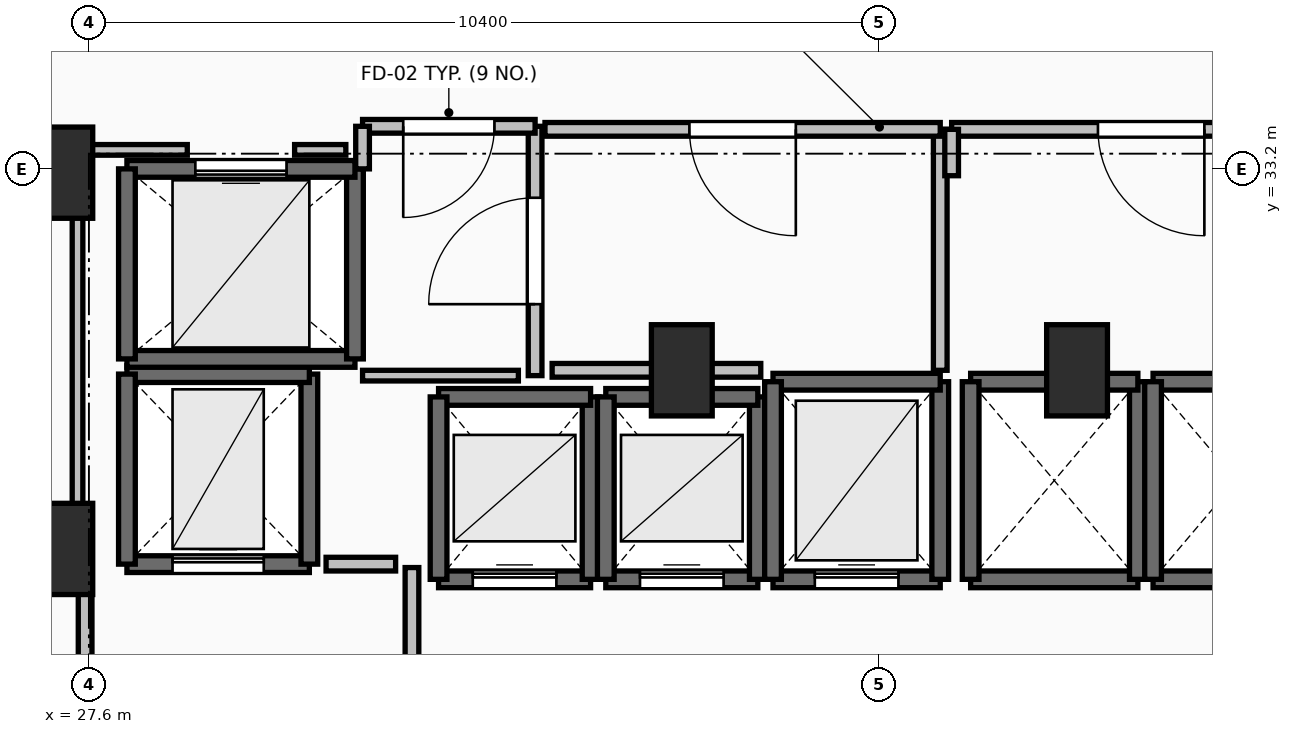
"""IFC4 building model, lengths in metres.
Left out: names, types, materials, properties, quantities, classifications, styles, units other than length and angle.
Written with IfcOpenShell. Run it as: python <this file> out.ifc"""

import sys

from ifc_helpers import new_model, si_unit, direction, frame, frame_2d, origin, origin_2d, place, context, subcontext, project, spatial, rectangle, extrude, element, fill, save


model = new_model("IFC4")
c1 = context("Model", 3, precision=1e-05, world=origin(), true_north=direction((0.0, 1.0)))
c2 = subcontext(c1, "Body", "Model", "MODEL_VIEW")
j1 = project(units=[si_unit("LENGTHUNIT", "METRE"), si_unit("PLANEANGLEUNIT", "RADIAN")], contexts=[c1])
p1 = place(None, origin())
s1 = spatial("IfcSite", under=j1, at=p1, CompositionType="ELEMENT")
p2 = place(p1, origin())
s2 = spatial("IfcBuilding", under=s1, at=p2, CompositionType="ELEMENT")
p3 = place(p2, frame((0.0, 0.0, 69.5)))
s3 = spatial("IfcBuildingStorey", under=s2, at=p3, CompositionType="ELEMENT", Elevation=69.5)
for number, where, z_axis, x_axis in (
    (1, (27.25, 28.2, 0.0), (0.0, 0.0, 1.0), (1.0, 0.0, 0.0)),
    (2, (27.25, 33.15, 0.0), (0.0, 0.0, 1.0), (1.0, 0.0, 0.0)),
    (3, (35.4, 30.55, 0.0), (0.0, 0.0, 1.0), (1.0, 0.0, 0.0)),
    (4, (40.6, 30.55, 0.0), (0.0, 0.0, 1.0), (1.0, 0.0, 0.0)),
):
    element("IfcColumn", number, at=place(p3, frame(where, z_axis=z_axis, x_axis=x_axis)), inside=s3, PredefinedType="PILASTER", context=c2, shape_type="SweptSolid", body=[
        extrude(rectangle(XDim=0.8, YDim=1.2, at=origin_2d()), origin(), (0.0, 0.0, 1.0), 4.8),
    ])
p4 = place(p3, frame((32.2, 27.8, 0.0), z_axis=(0.0, 0.0, 1.0), x_axis=(1.0, 0.0, 0.0)))
e5 = element("IfcWall", 5, at=p4, inside=s3, PredefinedType="SOLIDWALL", context=c2, shape_type="SweptSolid", body=[
    extrude(rectangle(XDim=2.0, YDim=0.22, at=frame_2d((1.0, 0.0))), origin(), (0.0, 0.0, 1.0), 4.5),
])
p5 = place(p4, frame((0.45, 0.0, 0.0)))
e6 = element("IfcOpeningElement", 6, at=p5, cuts=e5, PredefinedType="OPENING", context=c2, shape_type="SweptSolid", body=[
    extrude(rectangle(XDim=1.1, YDim=2.2, at=frame_2d((0.55, 1.1))), frame((0.0, 0.125, 0.0), z_axis=(0.0, -1.0, 0.0), x_axis=(1.0, 0.0, 0.0)), (0.0, 0.0, 1.0), 0.25),
])
p6 = place(p3, frame((34.2, 27.8, 0.0), z_axis=(0.0, 0.0, 1.0), x_axis=(0.0, 1.0, 0.0)))
e7 = element("IfcWall", 7, at=p6, inside=s3, PredefinedType="SOLIDWALL", context=c2, shape_type="SweptSolid", body=[
    extrude(rectangle(XDim=2.4, YDim=0.22, at=frame_2d((1.2, 0.0))), origin(), (0.0, 0.0, 1.0), 4.5),
])
p7 = place(p3, frame((34.2, 30.2, 0.0), z_axis=(0.0, 0.0, 1.0), x_axis=(-1.0, 0.0, 0.0)))
e8 = element("IfcWall", 8, at=p7, inside=s3, PredefinedType="SOLIDWALL", context=c2, shape_type="SweptSolid", body=[
    extrude(rectangle(XDim=2.0, YDim=0.22, at=frame_2d((1.0, 0.0))), origin(), (0.0, 0.0, 1.0), 4.5),
])
p8 = place(p3, frame((32.2, 30.2, 0.0), z_axis=(0.0, 0.0, 1.0), x_axis=(0.0, -1.0, 0.0)))
e9 = element("IfcWall", 9, at=p8, inside=s3, PredefinedType="SOLIDWALL", context=c2, shape_type="SweptSolid", body=[
    extrude(rectangle(XDim=2.4, YDim=0.22, at=frame_2d((1.2, 0.0))), origin(), (0.0, 0.0, 1.0), 4.5),
])
p9 = place(p3, frame((34.4, 27.8, 0.0), z_axis=(0.0, 0.0, 1.0), x_axis=(1.0, 0.0, 0.0)))
e10 = element("IfcWall", 10, at=p9, inside=s3, PredefinedType="SOLIDWALL", context=c2, shape_type="SweptSolid", body=[
    extrude(rectangle(XDim=2.0, YDim=0.22, at=frame_2d((1.0, 0.0))), origin(), (0.0, 0.0, 1.0), 4.5),
])
p10 = place(p9, frame((0.45, 0.0, 0.0)))
e11 = element("IfcOpeningElement", 11, at=p10, cuts=e10, PredefinedType="OPENING", context=c2, shape_type="SweptSolid", body=[
    extrude(rectangle(XDim=1.1, YDim=2.2, at=frame_2d((0.55, 1.1))), frame((0.0, 0.125, 0.0), z_axis=(0.0, -1.0, 0.0), x_axis=(1.0, 0.0, 0.0)), (0.0, 0.0, 1.0), 0.25),
])
p11 = place(p3, frame((36.4, 27.8, 0.0), z_axis=(0.0, 0.0, 1.0), x_axis=(0.0, 1.0, 0.0)))
e12 = element("IfcWall", 12, at=p11, inside=s3, PredefinedType="SOLIDWALL", context=c2, shape_type="SweptSolid", body=[
    extrude(rectangle(XDim=2.4, YDim=0.22, at=frame_2d((1.2, 0.0))), origin(), (0.0, 0.0, 1.0), 4.5),
])
p12 = place(p3, frame((36.4, 30.2, 0.0), z_axis=(0.0, 0.0, 1.0), x_axis=(-1.0, 0.0, 0.0)))
e13 = element("IfcWall", 13, at=p12, inside=s3, PredefinedType="SOLIDWALL", context=c2, shape_type="SweptSolid", body=[
    extrude(rectangle(XDim=2.0, YDim=0.22, at=frame_2d((1.0, 0.0))), origin(), (0.0, 0.0, 1.0), 4.5),
])
p13 = place(p3, frame((34.4, 30.2, 0.0), z_axis=(0.0, 0.0, 1.0), x_axis=(0.0, -1.0, 0.0)))
e14 = element("IfcWall", 14, at=p13, inside=s3, PredefinedType="SOLIDWALL", context=c2, shape_type="SweptSolid", body=[
    extrude(rectangle(XDim=2.4, YDim=0.22, at=frame_2d((1.2, 0.0))), origin(), (0.0, 0.0, 1.0), 4.5),
])
p14 = place(p3, frame((36.6, 27.8, 0.0), z_axis=(0.0, 0.0, 1.0), x_axis=(1.0, 0.0, 0.0)))
e15 = element("IfcWall", 15, at=p14, inside=s3, PredefinedType="SOLIDWALL", context=c2, shape_type="SweptSolid", body=[
    extrude(rectangle(XDim=2.2, YDim=0.22, at=frame_2d((1.1, 0.0))), origin(), (0.0, 0.0, 1.0), 4.5),
])
p15 = place(p14, frame((0.55, 0.0, 0.0)))
e16 = element("IfcOpeningElement", 16, at=p15, cuts=e15, PredefinedType="OPENING", context=c2, shape_type="SweptSolid", body=[
    extrude(rectangle(XDim=1.1, YDim=2.2, at=frame_2d((0.55, 1.1))), frame((0.0, 0.125, 0.0), z_axis=(0.0, -1.0, 0.0), x_axis=(1.0, 0.0, 0.0)), (0.0, 0.0, 1.0), 0.25),
])
p16 = place(p3, frame((38.8, 27.8, 0.0), z_axis=(0.0, 0.0, 1.0), x_axis=(0.0, 1.0, 0.0)))
e17 = element("IfcWall", 17, at=p16, inside=s3, PredefinedType="SOLIDWALL", context=c2, shape_type="SweptSolid", body=[
    extrude(rectangle(XDim=2.6, YDim=0.22, at=frame_2d((1.3, 0.0))), origin(), (0.0, 0.0, 1.0), 4.5),
])
p17 = place(p3, frame((38.8, 30.4, 0.0), z_axis=(0.0, 0.0, 1.0), x_axis=(-1.0, 0.0, 0.0)))
e18 = element("IfcWall", 18, at=p17, inside=s3, PredefinedType="SOLIDWALL", context=c2, shape_type="SweptSolid", body=[
    extrude(rectangle(XDim=2.2, YDim=0.22, at=frame_2d((1.1, 0.0))), origin(), (0.0, 0.0, 1.0), 4.5),
])
p18 = place(p3, frame((36.6, 30.4, 0.0), z_axis=(0.0, 0.0, 1.0), x_axis=(0.0, -1.0, 0.0)))
e19 = element("IfcWall", 19, at=p18, inside=s3, PredefinedType="SOLIDWALL", context=c2, shape_type="SweptSolid", body=[
    extrude(rectangle(XDim=2.6, YDim=0.22, at=frame_2d((1.3, 0.0))), origin(), (0.0, 0.0, 1.0), 4.5),
])
p19 = place(p3, frame((39.2, 27.8, 0.0), z_axis=(0.0, 0.0, 1.0), x_axis=(1.0, 0.0, 0.0)))
e20 = element("IfcWall", 20, at=p19, inside=s3, PredefinedType="SOLIDWALL", context=c2, shape_type="SweptSolid", body=[
    extrude(rectangle(XDim=2.2, YDim=0.22, at=frame_2d((1.1, 0.0))), origin(), (0.0, 0.0, 1.0), 4.5),
])
p20 = place(p3, frame((41.4, 27.8, 0.0), z_axis=(0.0, 0.0, 1.0), x_axis=(0.0, 1.0, 0.0)))
e21 = element("IfcWall", 21, at=p20, inside=s3, PredefinedType="SOLIDWALL", context=c2, shape_type="SweptSolid", body=[
    extrude(rectangle(XDim=2.6, YDim=0.22, at=frame_2d((1.3, 0.0))), origin(), (0.0, 0.0, 1.0), 4.5),
])
p21 = place(p3, frame((41.4, 30.4, 0.0), z_axis=(0.0, 0.0, 1.0), x_axis=(-1.0, 0.0, 0.0)))
e22 = element("IfcWall", 22, at=p21, inside=s3, PredefinedType="SOLIDWALL", context=c2, shape_type="SweptSolid", body=[
    extrude(rectangle(XDim=2.2, YDim=0.22, at=frame_2d((1.1, 0.0))), origin(), (0.0, 0.0, 1.0), 4.5),
])
p22 = place(p3, frame((39.2, 30.4, 0.0), z_axis=(0.0, 0.0, 1.0), x_axis=(0.0, -1.0, 0.0)))
e23 = element("IfcWall", 23, at=p22, inside=s3, PredefinedType="SOLIDWALL", context=c2, shape_type="SweptSolid", body=[
    extrude(rectangle(XDim=2.6, YDim=0.22, at=frame_2d((1.3, 0.0))), origin(), (0.0, 0.0, 1.0), 4.5),
])
for number, where, z_axis, x_axis in (
    (24, (41.6, 27.8, 0.0), (0.0, 0.0, 1.0), (1.0, 0.0, 0.0)),
    (25, (43.8, 30.4, 0.0), (0.0, 0.0, 1.0), (-1.0, 0.0, 0.0)),
):
    element("IfcWall", number, at=place(p3, frame(where, z_axis=z_axis, x_axis=x_axis)), inside=s3, PredefinedType="SOLIDWALL", context=c2, shape_type="SweptSolid", body=[
        extrude(rectangle(XDim=2.2, YDim=0.22, at=frame_2d((1.1, 0.0))), origin(), (0.0, 0.0, 1.0), 4.5),
    ])
p23 = place(p3, frame((41.6, 30.4, 0.0), z_axis=(0.0, 0.0, 1.0), x_axis=(0.0, -1.0, 0.0)))
e26 = element("IfcWall", 26, at=p23, inside=s3, PredefinedType="SOLIDWALL", context=c2, shape_type="SweptSolid", body=[
    extrude(rectangle(XDim=2.6, YDim=0.22, at=frame_2d((1.3, 0.0))), origin(), (0.0, 0.0, 1.0), 4.5),
])
p24 = place(p3, frame((28.1, 28.0, 0.0), z_axis=(0.0, 0.0, 1.0), x_axis=(1.0, 0.0, 0.0)))
e27 = element("IfcWall", 27, at=p24, inside=s3, PredefinedType="SHEAR", context=c2, shape_type="SweptSolid", body=[
    extrude(rectangle(XDim=2.4, YDim=0.22, at=frame_2d((1.2, 0.0))), origin(), (0.0, 0.0, 1.0), 4.5),
])
p25 = place(p24, frame((0.6, 0.0, 0.0)))
e28 = element("IfcOpeningElement", 28, at=p25, cuts=e27, PredefinedType="OPENING", context=c2, shape_type="SweptSolid", body=[
    extrude(rectangle(XDim=1.2, YDim=2.2, at=frame_2d((0.6, 1.1))), frame((0.0, 0.125, 0.0), z_axis=(0.0, -1.0, 0.0), x_axis=(1.0, 0.0, 0.0)), (0.0, 0.0, 1.0), 0.25),
])
p26 = place(p3, frame((30.5, 28.0, 0.0), z_axis=(0.0, 0.0, 1.0), x_axis=(0.0, 1.0, 0.0)))
e29 = element("IfcWall", 29, at=p26, inside=s3, PredefinedType="SHEAR", context=c2, shape_type="SweptSolid", body=[
    extrude(rectangle(XDim=2.5, YDim=0.22, at=frame_2d((1.25, 0.0))), origin(), (0.0, 0.0, 1.0), 4.5),
])
p27 = place(p3, frame((30.5, 30.5, 0.0), z_axis=(0.0, 0.0, 1.0), x_axis=(-1.0, 0.0, 0.0)))
e30 = element("IfcWall", 30, at=p27, inside=s3, PredefinedType="SHEAR", context=c2, shape_type="SweptSolid", body=[
    extrude(rectangle(XDim=2.4, YDim=0.22, at=frame_2d((1.2, 0.0))), origin(), (0.0, 0.0, 1.0), 4.5),
])
p28 = place(p3, frame((28.1, 30.5, 0.0), z_axis=(0.0, 0.0, 1.0), x_axis=(0.0, -1.0, 0.0)))
e31 = element("IfcWall", 31, at=p28, inside=s3, PredefinedType="SHEAR", context=c2, shape_type="SweptSolid", body=[
    extrude(rectangle(XDim=2.5, YDim=0.22, at=frame_2d((1.25, 0.0))), origin(), (0.0, 0.0, 1.0), 4.5),
])
p29 = place(p3, frame((28.1, 30.7, 0.0), z_axis=(0.0, 0.0, 1.0), x_axis=(1.0, 0.0, 0.0)))
e32 = element("IfcWall", 32, at=p29, inside=s3, PredefinedType="SOLIDWALL", context=c2, shape_type="SweptSolid", body=[
    extrude(rectangle(XDim=3.0, YDim=0.22, at=frame_2d((1.5, 0.0))), origin(), (0.0, 0.0, 1.0), 4.5),
])
p30 = place(p3, frame((31.1, 30.7, 0.0), z_axis=(0.0, 0.0, 1.0), x_axis=(0.0, 1.0, 0.0)))
e33 = element("IfcWall", 33, at=p30, inside=s3, PredefinedType="SOLIDWALL", context=c2, shape_type="SweptSolid", body=[
    extrude(rectangle(XDim=2.5, YDim=0.22, at=frame_2d((1.25, 0.0))), origin(), (0.0, 0.0, 1.0), 4.5),
])
p31 = place(p3, frame((31.1, 33.2, 0.0), z_axis=(0.0, 0.0, 1.0), x_axis=(-1.0, 0.0, 0.0)))
e34 = element("IfcWall", 34, at=p31, inside=s3, PredefinedType="SOLIDWALL", context=c2, shape_type="SweptSolid", body=[
    extrude(rectangle(XDim=3.0, YDim=0.22, at=frame_2d((1.5, 0.0))), origin(), (0.0, 0.0, 1.0), 4.5),
])
p32 = place(p31, frame((0.9, 0.0, 0.0)))
e35 = element("IfcOpeningElement", 35, at=p32, cuts=e34, PredefinedType="OPENING", context=c2, shape_type="SweptSolid", body=[
    extrude(rectangle(XDim=1.2, YDim=2.2, at=frame_2d((0.6, 1.1))), frame((0.0, 0.125, 0.0), z_axis=(0.0, -1.0, 0.0), x_axis=(1.0, 0.0, 0.0)), (0.0, 0.0, 1.0), 0.25),
])
p33 = place(p3, frame((28.1, 33.2, 0.0), z_axis=(0.0, 0.0, 1.0), x_axis=(0.0, -1.0, 0.0)))
e36 = element("IfcWall", 36, at=p33, inside=s3, PredefinedType="SOLIDWALL", context=c2, shape_type="SweptSolid", body=[
    extrude(rectangle(XDim=2.5, YDim=0.22, at=frame_2d((1.25, 0.0))), origin(), (0.0, 0.0, 1.0), 4.5),
])
p34 = place(p3, frame((31.85, 24.045, 0.0), z_axis=(0.0, 0.0, 1.0), x_axis=(0.0, 1.0, 0.0)))
e37 = element("IfcWall", 37, at=p34, inside=s3, PredefinedType="PARTITIONING", context=c2, shape_type="SweptSolid", body=[
    extrude(rectangle(XDim=3.91, YDim=0.18, at=frame_2d((1.955, 0.0))), origin(), (0.0, 0.0, 1.0), 4.5),
])
p35 = place(p34, frame((1.355, 0.0, 0.0)))
e38 = element("IfcOpeningElement", 38, at=p35, cuts=e37, PredefinedType="OPENING", context=c2, shape_type="SweptSolid", body=[
    extrude(rectangle(XDim=1.2, YDim=2.15, at=frame_2d((0.6, 1.075))), frame((0.0, 0.105, 0.0), z_axis=(0.0, -1.0, 0.0), x_axis=(1.0, 0.0, 0.0)), (0.0, 0.0, 1.0), 0.21),
])
p36 = place(p3, frame((27.55, 28.0, 0.0), z_axis=(0.0, 0.0, 1.0), x_axis=(0.0, -1.0, 0.0)))
e39 = element("IfcWall", 39, at=p36, inside=s3, PredefinedType="PARTITIONING", context=c2, shape_type="SweptSolid", body=[
    extrude(rectangle(XDim=4.05, YDim=0.18, at=frame_2d((2.025, 0.0))), origin(), (0.0, 0.0, 1.0), 3.482),
])
p37 = place(p36, frame((1.425, 0.0, 0.0)))
e40 = element("IfcOpeningElement", 40, at=p37, cuts=e39, PredefinedType="OPENING", context=c2, shape_type="SweptSolid", body=[
    extrude(rectangle(XDim=1.2, YDim=2.15, at=frame_2d((0.6, 1.075))), frame((0.0, 0.105, 0.0), z_axis=(0.0, -1.0, 0.0), x_axis=(1.0, 0.0, 0.0)), (0.0, 0.0, 1.0), 0.21),
])
p38 = place(p3, frame((33.47, 30.48, 0.0), z_axis=(0.0, 0.0, 1.0), x_axis=(0.0, 1.0, 0.0)))
e41 = element("IfcWall", 41, at=p38, inside=s3, PredefinedType="PARTITIONING", context=c2, shape_type="SweptSolid", body=[
    extrude(rectangle(XDim=3.28, YDim=0.18, at=frame_2d((1.64, 0.0))), origin(), (0.0, 0.0, 1.0), 4.5),
])
p39 = place(p38, frame((0.94, 0.0, 0.0)))
e42 = element("IfcOpeningElement", 42, at=p39, cuts=e41, PredefinedType="OPENING", context=c2, shape_type="SweptSolid", body=[
    extrude(rectangle(XDim=1.4, YDim=2.2, at=frame_2d((0.7, 1.1))), frame((0.0, 0.105, 0.0), z_axis=(0.0, -1.0, 0.0), x_axis=(1.0, 0.0, 0.0)), (0.0, 0.0, 1.0), 0.21),
])
p40 = place(p3, frame((33.47, 33.76, 0.0), z_axis=(0.0, 0.0, 1.0), x_axis=(-1.0, 0.0, 0.0)))
e43 = element("IfcWall", 43, at=p40, inside=s3, PredefinedType="PARTITIONING", context=c2, shape_type="SweptSolid", body=[
    extrude(rectangle(XDim=2.27, YDim=0.18, at=frame_2d((1.135, 0.0))), origin(), (0.0, 0.0, 1.0), 4.5),
])
p41 = place(p40, frame((0.535, 0.0, 0.0)))
e44 = element("IfcOpeningElement", 44, at=p41, cuts=e43, PredefinedType="OPENING", context=c2, shape_type="SweptSolid", body=[
    extrude(rectangle(XDim=1.2, YDim=2.15, at=frame_2d((0.6, 1.075))), frame((0.0, 0.105, 0.0), z_axis=(0.0, -1.0, 0.0), x_axis=(1.0, 0.0, 0.0)), (0.0, 0.0, 1.0), 0.21),
])
p42 = place(p3, frame((31.2, 33.76, 0.0), z_axis=(0.0, 0.0, 1.0), x_axis=(0.0, -1.0, 0.0)))
e45 = element("IfcWall", 45, at=p42, inside=s3, PredefinedType="PARTITIONING", context=c2, shape_type="SweptSolid", body=[
    extrude(rectangle(XDim=0.56, YDim=0.18, at=frame_2d((0.28, 0.0))), origin(), (0.0, 0.0, 1.0), 4.5),
])
p43 = place(p3, frame((38.8, 30.55, 0.0), z_axis=(0.0, 0.0, 1.0), x_axis=(0.0, 1.0, 0.0)))
e46 = element("IfcWall", 46, at=p43, inside=s3, PredefinedType="PARTITIONING", context=c2, shape_type="SweptSolid", body=[
    extrude(rectangle(XDim=3.17, YDim=0.18, at=frame_2d((1.585, 0.0))), origin(), (0.0, 0.0, 1.0), 3.482),
])
p44 = place(p3, frame((38.8, 33.72, 0.0), z_axis=(0.0, 0.0, 1.0), x_axis=(-1.0, 0.0, 0.0)))
e47 = element("IfcWall", 47, at=p44, inside=s3, PredefinedType="PARTITIONING", context=c2, shape_type="SweptSolid", body=[
    extrude(rectangle(XDim=5.2, YDim=0.18, at=frame_2d((2.6, 0.0))), origin(), (0.0, 0.0, 1.0), 4.5),
])
p45 = place(p44, frame((1.9, 0.0, 0.0)))
e48 = element("IfcOpeningElement", 48, at=p45, cuts=e47, PredefinedType="OPENING", context=c2, shape_type="SweptSolid", body=[
    extrude(rectangle(XDim=1.4, YDim=2.2, at=frame_2d((0.7, 1.1))), frame((0.0, 0.105, 0.0), z_axis=(0.0, -1.0, 0.0), x_axis=(1.0, 0.0, 0.0)), (0.0, 0.0, 1.0), 0.21),
])
p46 = place(p3, frame((44.2, 33.72, 0.0), z_axis=(0.0, 0.0, 1.0), x_axis=(-1.0, 0.0, 0.0)))
e49 = element("IfcWall", 49, at=p46, inside=s3, PredefinedType="PARTITIONING", context=c2, shape_type="SweptSolid", body=[
    extrude(rectangle(XDim=5.25, YDim=0.18, at=frame_2d((2.625, 0.0))), origin(), (0.0, 0.0, 1.0), 4.5),
])
p47 = place(p46, frame((1.925, 0.0, 0.0)))
e50 = element("IfcOpeningElement", 50, at=p47, cuts=e49, PredefinedType="OPENING", context=c2, shape_type="SweptSolid", body=[
    extrude(rectangle(XDim=1.4, YDim=2.2, at=frame_2d((0.7, 1.1))), frame((0.0, 0.105, 0.0), z_axis=(0.0, -1.0, 0.0), x_axis=(1.0, 0.0, 0.0)), (0.0, 0.0, 1.0), 0.21),
])
p48 = place(p3, frame((38.95, 33.72, 0.0), z_axis=(0.0, 0.0, 1.0), x_axis=(0.0, -1.0, 0.0)))
e51 = element("IfcWall", 51, at=p48, inside=s3, PredefinedType="PARTITIONING", context=c2, shape_type="SweptSolid", body=[
    extrude(rectangle(XDim=0.61, YDim=0.18, at=frame_2d((0.305, 0.0))), origin(), (0.0, 0.0, 1.0), 4.5),
])
p49 = place(p3, frame((31.635, 28.0, 0.0), z_axis=(0.0, 0.0, 1.0), x_axis=(-1.0, 0.0, 0.0)))
e52 = element("IfcWall", 52, at=p49, inside=s3, PredefinedType="PARTITIONING", context=c2, shape_type="SweptSolid", body=[
    extrude(rectangle(XDim=0.915, YDim=0.18, at=frame_2d((0.458, 0.0))), origin(), (0.0, 0.0, 1.0), 4.5),
])
p50 = place(p3, frame((31.2, 30.48, 0.0), z_axis=(0.0, 0.0, 1.0), x_axis=(1.0, 0.0, 0.0)))
e53 = element("IfcWall", 53, at=p50, inside=s3, PredefinedType="PARTITIONING", context=c2, shape_type="SweptSolid", body=[
    extrude(rectangle(XDim=2.05, YDim=0.14, at=frame_2d((1.025, 0.0))), origin(), (0.0, 0.0, 1.0), 4.5),
])
p51 = place(p3, frame((33.694, 30.55, 0.0), z_axis=(0.0, 0.0, 1.0), x_axis=(1.0, 0.0, 0.0)))
e54 = element("IfcWall", 54, at=p51, inside=s3, PredefinedType="PARTITIONING", context=c2, shape_type="SweptSolid", body=[
    extrude(rectangle(XDim=2.745, YDim=0.18, at=frame_2d((1.373, 0.0))), origin(), (0.0, 0.0, 1.0), 3.482),
])
p52 = place(p3, frame((27.45, 28.196, 0.0), z_axis=(0.0, 0.0, 1.0), x_axis=(0.0, 1.0, 0.0)))
e55 = element("IfcWall", 55, at=p52, inside=s3, PredefinedType="PARTITIONING", context=c2, shape_type="SweptSolid", body=[
    extrude(rectangle(XDim=5.254, YDim=0.14, at=frame_2d((2.627, 0.0))), origin(), (0.0, 0.0, 1.0), 3.482),
])
p53 = place(p3, frame((27.45, 33.45, 0.0), z_axis=(0.0, 0.0, 1.0), x_axis=(1.0, 0.0, 0.0)))
e56 = element("IfcWall", 56, at=p53, inside=s3, PredefinedType="PARTITIONING", context=c2, shape_type="SweptSolid", body=[
    extrude(rectangle(XDim=1.444, YDim=0.14, at=frame_2d((0.722, 0.0))), origin(), (0.0, 0.0, 1.0), 3.482),
])
p54 = place(p3, frame((30.306, 33.45, 0.0), z_axis=(0.0, 0.0, 1.0), x_axis=(1.0, 0.0, 0.0)))
e57 = element("IfcWall", 57, at=p54, inside=s3, PredefinedType="PARTITIONING", context=c2, shape_type="SweptSolid", body=[
    extrude(rectangle(XDim=0.674, YDim=0.14, at=frame_2d((0.337, 0.0))), origin(), (0.0, 0.0, 1.0), 4.5),
])
p55 = place(p5, origin())
e58 = element("IfcDoor", 58, at=p55, inside=s3, OperationType="SLIDING_TO_LEFT", PredefinedType="DOOR", context=c2, shape_type="SweptSolid", body=[
    extrude(rectangle(XDim=1.1, YDim=2.2, at=frame_2d((0.55, 1.1))), frame((0.0, 0.025, 0.0), z_axis=(0.0, -1.0, 0.0), x_axis=(1.0, 0.0, 0.0)), (0.0, 0.0, 1.0), 0.05),
])
fill(e6, e58)
p56 = place(p10, origin())
e59 = element("IfcDoor", 59, at=p56, inside=s3, OperationType="SLIDING_TO_LEFT", PredefinedType="DOOR", context=c2, shape_type="SweptSolid", body=[
    extrude(rectangle(XDim=1.1, YDim=2.2, at=frame_2d((0.55, 1.1))), frame((0.0, 0.025, 0.0), z_axis=(0.0, -1.0, 0.0), x_axis=(1.0, 0.0, 0.0)), (0.0, 0.0, 1.0), 0.05),
])
fill(e11, e59)
p57 = place(p15, origin())
e60 = element("IfcDoor", 60, at=p57, inside=s3, OperationType="SLIDING_TO_LEFT", PredefinedType="DOOR", context=c2, shape_type="SweptSolid", body=[
    extrude(rectangle(XDim=1.1, YDim=2.2, at=frame_2d((0.55, 1.1))), frame((0.0, 0.025, 0.0), z_axis=(0.0, -1.0, 0.0), x_axis=(1.0, 0.0, 0.0)), (0.0, 0.0, 1.0), 0.05),
])
fill(e16, e60)
p58 = place(p25, origin())
e61 = element("IfcDoor", 61, at=p58, inside=s3, OperationType="SLIDING_TO_LEFT", PredefinedType="DOOR", context=c2, shape_type="SweptSolid", body=[
    extrude(rectangle(XDim=1.2, YDim=2.2, at=frame_2d((0.6, 1.1))), frame((0.0, 0.025, 0.0), z_axis=(0.0, -1.0, 0.0), x_axis=(1.0, 0.0, 0.0)), (0.0, 0.0, 1.0), 0.05),
])
fill(e28, e61)
p59 = place(p32, origin())
e62 = element("IfcDoor", 62, at=p59, inside=s3, OperationType="SLIDING_TO_LEFT", PredefinedType="DOOR", context=c2, shape_type="SweptSolid", body=[
    extrude(rectangle(XDim=1.2, YDim=2.2, at=frame_2d((0.6, 1.1))), frame((0.0, 0.025, 0.0), z_axis=(0.0, -1.0, 0.0), x_axis=(1.0, 0.0, 0.0)), (0.0, 0.0, 1.0), 0.05),
])
fill(e35, e62)
p60 = place(p39, origin())
e63 = element("IfcDoor", 63, at=p60, inside=s3, OperationType="DOUBLE_SWING_LEFT", PredefinedType="DOOR", context=c2, shape_type="SweptSolid", body=[
    extrude(rectangle(XDim=1.4, YDim=2.2, at=frame_2d((0.7, 1.1))), frame((0.0, 0.025, 0.0), z_axis=(0.0, -1.0, 0.0), x_axis=(1.0, 0.0, 0.0)), (0.0, 0.0, 1.0), 0.05),
])
fill(e42, e63)
p61 = place(p41, origin())
e64 = element("IfcDoor", 64, at=p61, inside=s3, OperationType="SINGLE_SWING_RIGHT", PredefinedType="DOOR", context=c2, shape_type="SweptSolid", body=[
    extrude(rectangle(XDim=1.2, YDim=2.15, at=frame_2d((0.6, 1.075))), frame((0.0, 0.025, 0.0), z_axis=(0.0, -1.0, 0.0), x_axis=(1.0, 0.0, 0.0)), (0.0, 0.0, 1.0), 0.05),
])
fill(e44, e64)
p62 = place(p45, origin())
e65 = element("IfcDoor", 65, at=p62, inside=s3, OperationType="DOUBLE_SWING_LEFT", PredefinedType="DOOR", context=c2, shape_type="SweptSolid", body=[
    extrude(rectangle(XDim=1.4, YDim=2.2, at=frame_2d((0.7, 1.1))), frame((0.0, 0.025, 0.0), z_axis=(0.0, -1.0, 0.0), x_axis=(1.0, 0.0, 0.0)), (0.0, 0.0, 1.0), 0.05),
])
fill(e48, e65)
p63 = place(p47, origin())
e66 = element("IfcDoor", 66, at=p63, inside=s3, OperationType="DOUBLE_SWING_LEFT", PredefinedType="DOOR", context=c2, shape_type="SweptSolid", body=[
    extrude(rectangle(XDim=1.4, YDim=2.2, at=frame_2d((0.7, 1.1))), frame((0.0, 0.025, 0.0), z_axis=(0.0, -1.0, 0.0), x_axis=(1.0, 0.0, 0.0)), (0.0, 0.0, 1.0), 0.05),
])
fill(e50, e66)
save(model, sys.argv[1])
